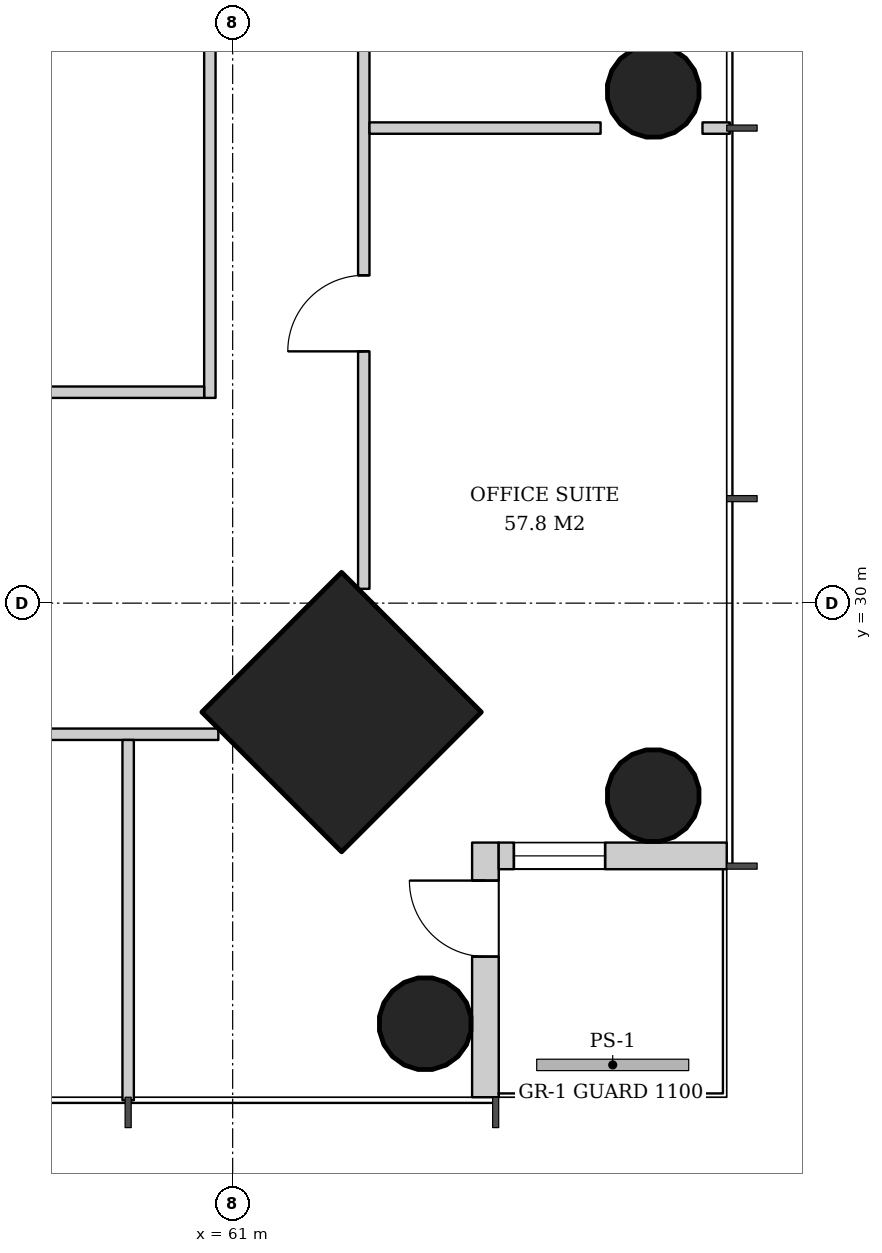
"""IFC4 building model, lengths in metres.
Left out: names, types, materials, properties, quantities, classifications, styles, units other than length and angle.
Written with IfcOpenShell. Run it as: python <this file> out.ifc"""

import sys

from ifc_helpers import new_model, si_unit, direction, frame, frame_2d, origin, origin_2d, place, context, subcontext, project, spatial, rectangle, hollow_circle, extrude, element, fill, save


model = new_model("IFC4")
c1 = context("Model", 3, precision=1e-05, world=origin(), true_north=direction((0.0, 1.0)))
c2 = subcontext(c1, "Body", "Model", "MODEL_VIEW")
j1 = project(units=[si_unit("LENGTHUNIT", "METRE"), si_unit("PLANEANGLEUNIT", "RADIAN")], contexts=[c1])
p1 = place(None, origin())
s1 = spatial("IfcSite", under=j1, at=p1, CompositionType="ELEMENT")
p2 = place(p1, origin())
s2 = spatial("IfcBuilding", under=s1, at=p2, CompositionType="ELEMENT")
p3 = place(p2, frame((0.0, 0.0, 97.0)))
s3 = spatial("IfcBuildingStorey", under=s2, at=p3, CompositionType="ELEMENT", Elevation=97.0)
p4 = place(p3, frame((66.572, 27.428, 0.0), z_axis=(-0.031962158256, 0.031962158256, 0.998977898093), x_axis=(-0.707106781187, -0.707106781187, 0.0)))
e1 = element("IfcColumn", 1, at=p4, inside=s3, PredefinedType="COLUMN", context=c2, shape_type="SweptSolid", body=[
    extrude(hollow_circle(Radius=0.61, WallThickness=0.04, at=origin_2d()), origin(), (0.0, 0.0, 1.0), 3.804),
])
p5 = place(p3, frame((66.572, 36.714, 0.0), z_axis=(-0.031974442509, 0.015923015547, 0.999361842679), x_axis=(-0.445775033553, -0.895145027055, 0.0)))
e2 = element("IfcColumn", 2, at=p5, inside=s3, PredefinedType="COLUMN", context=c2, shape_type="SweptSolid", body=[
    extrude(hollow_circle(Radius=0.61, WallThickness=0.04, at=origin_2d()), origin(), (0.0, 0.0, 1.0), 3.802),
])
p6 = place(p3, frame((62.471, 28.529, 0.0), z_axis=(-0.031898107953, 0.031898107953, 0.998981992539), x_axis=(-0.707106781187, -0.707106781187, 0.0)))
e3 = element("IfcColumn", 3, at=p6, inside=s3, PredefinedType="COLUMN", context=c2, shape_type="SweptSolid", body=[
    extrude(rectangle(XDim=2.6, YDim=2.6, at=origin_2d()), origin(), (0.0, 0.0, 1.0), 3.804),
])
p7 = place(p3, frame((63.572, 24.428, 0.0), z_axis=(-0.031962158256, 0.031962158256, 0.998977898093), x_axis=(-0.707106781187, -0.707106781187, 0.0)))
e4 = element("IfcColumn", 4, at=p7, inside=s3, PredefinedType="COLUMN", context=c2, shape_type="SweptSolid", body=[
    extrude(hollow_circle(Radius=0.61, WallThickness=0.04, at=origin_2d()), origin(), (0.0, 0.0, 1.0), 3.804),
])
p8 = place(p3, frame((64.325, 23.5, 0.0), z_axis=(0.0, 0.0, 1.0), x_axis=(0.0, 1.0, 0.0)))
e5 = element("IfcWall", 5, at=p8, inside=s3, PredefinedType="SOLIDWALL", context=c2, shape_type="SweptSolid", body=[
    extrude(rectangle(XDim=3.35, YDim=0.35, at=frame_2d((1.675, 0.0))), origin(), (0.0, 0.0, 1.0), 3.62),
])
p9 = place(p8, frame((1.85, 0.0, 0.0)))
e6 = element("IfcOpeningElement", 6, at=p9, cuts=e5, PredefinedType="OPENING", context=c2, shape_type="SweptSolid", body=[
    extrude(rectangle(XDim=1.0, YDim=2.4, at=frame_2d((0.5, 1.2))), frame((0.0, 0.185, 0.0), z_axis=(0.0, -1.0, 0.0), x_axis=(1.0, 0.0, 0.0)), (0.0, 0.0, 1.0), 0.37),
])
p10 = place(p3, frame((64.5, 26.675, 0.0), z_axis=(0.0, 0.0, 1.0), x_axis=(1.0, 0.0, 0.0)))
e7 = element("IfcWall", 7, at=p10, inside=s3, PredefinedType="SOLIDWALL", context=c2, shape_type="SweptSolid", body=[
    extrude(rectangle(XDim=3.0, YDim=0.35, at=frame_2d((1.5, 0.0))), origin(), (0.0, 0.0, 1.0), 3.62),
])
p11 = place(p10, frame((0.2, 0.0, 0.6)))
e8 = element("IfcOpeningElement", 8, at=p11, cuts=e7, PredefinedType="OPENING", context=c2, shape_type="SweptSolid", body=[
    extrude(rectangle(XDim=1.2, YDim=2.55, at=frame_2d((0.6, 1.275))), frame((0.0, 0.185, 0.0), z_axis=(0.0, -1.0, 0.0), x_axis=(1.0, 0.0, 0.0)), (0.0, 0.0, 1.0), 0.37),
])
p12 = place(p3, frame((60.7, 32.7, 0.0), z_axis=(0.0, 0.0, 1.0), x_axis=(0.0, 1.0, 0.0)))
e9 = element("IfcWall", 9, at=p12, inside=s3, PredefinedType="PARTITIONING", context=c2, shape_type="SweptSolid", body=[
    extrude(rectangle(XDim=11.275, YDim=0.15, at=frame_2d((5.638, 0.0))), origin(), (0.0, 0.0, 1.0), 2.72),
])
p13 = place(p12, frame((5.137, 0.0, 0.0)))
e10 = element("IfcOpeningElement", 10, at=p13, cuts=e9, PredefinedType="OPENING", context=c2, shape_type="SweptSolid", body=[
    extrude(rectangle(XDim=1.0, YDim=2.1, at=frame_2d((0.5, 1.05))), frame((0.0, 0.085, 0.0), z_axis=(0.0, -1.0, 0.0), x_axis=(1.0, 0.0, 0.0)), (0.0, 0.0, 1.0), 0.17),
])
p14 = place(p3, frame((58.3, 32.775, 0.0), z_axis=(0.0, 0.0, 1.0), x_axis=(1.0, 0.0, 0.0)))
e11 = element("IfcWall", 11, at=p14, inside=s3, PredefinedType="PARTITIONING", context=c2, shape_type="SweptSolid", body=[
    extrude(rectangle(XDim=2.325, YDim=0.15, at=frame_2d((1.163, 0.0))), origin(), (0.0, 0.0, 1.0), 3.62),
])
p15 = place(p3, frame((62.725, 30.188, 0.0), z_axis=(0.0, 0.0, 1.0), x_axis=(0.0, 1.0, 0.0)))
e12 = element("IfcWall", 12, at=p15, inside=s3, PredefinedType="PARTITIONING", context=c2, shape_type="SweptSolid", body=[
    extrude(rectangle(XDim=31.623, YDim=0.15, at=frame_2d((15.812, 0.0))), origin(), (0.0, 0.0, 1.0), 2.72),
])
p16 = place(p15, frame((3.124, 0.0, 0.0)))
e13 = element("IfcOpeningElement", 13, at=p16, cuts=e12, PredefinedType="OPENING", context=c2, shape_type="SweptSolid", body=[
    extrude(rectangle(XDim=1.0, YDim=2.1, at=frame_2d((0.5, 1.05))), frame((0.0, 0.085, 0.0), z_axis=(0.0, -1.0, 0.0), x_axis=(1.0, 0.0, 0.0)), (0.0, 0.0, 1.0), 0.17),
])
p17 = place(p15, frame((7.999, 0.0, 0.0)))
e14 = element("IfcOpeningElement", 14, at=p17, cuts=e12, PredefinedType="OPENING", context=c2, shape_type="SweptSolid", body=[
    extrude(rectangle(XDim=1.0, YDim=2.1, at=frame_2d((0.5, 1.05))), frame((0.0, 0.085, 0.0), z_axis=(0.0, -1.0, 0.0), x_axis=(1.0, 0.0, 0.0)), (0.0, 0.0, 1.0), 0.17),
])
p18 = place(p15, frame((12.874, 0.0, 0.0)))
e15 = element("IfcOpeningElement", 15, at=p18, cuts=e12, PredefinedType="OPENING", context=c2, shape_type="SweptSolid", body=[
    extrude(rectangle(XDim=1.0, YDim=2.1, at=frame_2d((0.5, 1.05))), frame((0.0, 0.085, 0.0), z_axis=(0.0, -1.0, 0.0), x_axis=(1.0, 0.0, 0.0)), (0.0, 0.0, 1.0), 0.17),
])
p19 = place(p15, frame((17.749, 0.0, 0.0)))
e16 = element("IfcOpeningElement", 16, at=p19, cuts=e12, PredefinedType="OPENING", context=c2, shape_type="SweptSolid", body=[
    extrude(rectangle(XDim=1.0, YDim=2.1, at=frame_2d((0.5, 1.05))), frame((0.0, 0.085, 0.0), z_axis=(0.0, -1.0, 0.0), x_axis=(1.0, 0.0, 0.0)), (0.0, 0.0, 1.0), 0.17),
])
p20 = place(p15, frame((27.499, 0.0, 0.0)))
e17 = element("IfcOpeningElement", 17, at=p20, cuts=e12, PredefinedType="OPENING", context=c2, shape_type="SweptSolid", body=[
    extrude(rectangle(XDim=1.0, YDim=2.1, at=frame_2d((0.5, 1.05))), frame((0.0, 0.085, 0.0), z_axis=(0.0, -1.0, 0.0), x_axis=(1.0, 0.0, 0.0)), (0.0, 0.0, 1.0), 0.17),
])
p21 = place(p3, frame((62.8, 36.25, 0.0), z_axis=(0.0, 0.0, 1.0), x_axis=(1.0, 0.0, 0.0)))
e18 = element("IfcWall", 18, at=p21, inside=s3, PredefinedType="PARTITIONING", context=c2, shape_type="SweptSolid", body=[
    extrude(rectangle(XDim=3.041, YDim=0.15, at=frame_2d((1.52, 0.0))), origin(), (0.0, 0.0, 1.0), 3.62),
])
p22 = place(p3, frame((67.181, 36.25, 0.0), z_axis=(0.0, 0.0, 1.0), x_axis=(1.0, 0.0, 0.0)))
e19 = element("IfcWall", 19, at=p22, inside=s3, PredefinedType="PARTITIONING", context=c2, shape_type="SweptSolid", body=[
    extrude(rectangle(XDim=0.359, YDim=0.15, at=frame_2d((0.18, 0.0))), origin(), (0.0, 0.0, 1.0), 3.62),
])
p23 = place(p3, frame((29.188, 28.275, 0.0), z_axis=(0.0, 0.0, 1.0), x_axis=(1.0, 0.0, 0.0)))
e20 = element("IfcWall", 20, at=p23, inside=s3, PredefinedType="PARTITIONING", context=c2, shape_type="SweptSolid", body=[
    extrude(rectangle(XDim=31.623, YDim=0.15, at=frame_2d((15.812, 0.0))), origin(), (0.0, 0.0, 1.0), 2.72),
])
p24 = place(p23, frame((2.724, 0.0, 0.0)))
e21 = element("IfcOpeningElement", 21, at=p24, cuts=e20, PredefinedType="OPENING", context=c2, shape_type="SweptSolid", body=[
    extrude(rectangle(XDim=1.8, YDim=2.4, at=frame_2d((0.9, 1.2))), frame((0.0, 0.085, 0.0), z_axis=(0.0, -1.0, 0.0), x_axis=(1.0, 0.0, 0.0)), (0.0, 0.0, 1.0), 0.17),
])
p25 = place(p23, frame((7.599, 0.0, 0.0)))
e22 = element("IfcOpeningElement", 22, at=p25, cuts=e20, PredefinedType="OPENING", context=c2, shape_type="SweptSolid", body=[
    extrude(rectangle(XDim=1.8, YDim=2.4, at=frame_2d((0.9, 1.2))), frame((0.0, 0.085, 0.0), z_axis=(0.0, -1.0, 0.0), x_axis=(1.0, 0.0, 0.0)), (0.0, 0.0, 1.0), 0.17),
])
p26 = place(p3, frame((59.625, 28.2, 0.0), z_axis=(0.0, 0.0, 1.0), x_axis=(0.0, -1.0, 0.0)))
e23 = element("IfcWall", 23, at=p26, inside=s3, PredefinedType="PARTITIONING", context=c2, shape_type="SweptSolid", body=[
    extrude(rectangle(XDim=4.74, YDim=0.15, at=frame_2d((2.37, 0.0))), origin(), (0.0, 0.0, 1.0), 2.82),
])
p27 = place(p9, origin())
e24 = element("IfcDoor", 24, at=p27, inside=s3, OperationType="SINGLE_SWING_RIGHT", PredefinedType="DOOR", context=c2, shape_type="SweptSolid", body=[
    extrude(rectangle(XDim=1.0, YDim=2.4, at=frame_2d((0.5, 1.2))), frame((0.0, 0.025, 0.0), z_axis=(0.0, -1.0, 0.0), x_axis=(1.0, 0.0, 0.0)), (0.0, 0.0, 1.0), 0.05),
])
fill(e6, e24)
p28 = place(p11, origin())
e25 = element("IfcWindow", 25, at=p28, inside=s3, PartitioningType="SINGLE_PANEL", PredefinedType="WINDOW", context=c2, shape_type="SweptSolid", body=[
    extrude(rectangle(XDim=1.2, YDim=2.55, at=frame_2d((0.6, 1.275))), frame((0.0, 0.03, 0.0), z_axis=(0.0, -1.0, 0.0), x_axis=(1.0, 0.0, 0.0)), (0.0, 0.0, 1.0), 0.06),
])
fill(e8, e25)
p29 = place(p16, origin())
e26 = element("IfcDoor", 26, at=p29, inside=s3, OperationType="SINGLE_SWING_LEFT", PredefinedType="DOOR", context=c2, shape_type="SweptSolid", body=[
    extrude(rectangle(XDim=1.0, YDim=2.1, at=frame_2d((0.5, 1.05))), frame((0.0, 0.025, 0.0), z_axis=(0.0, -1.0, 0.0), x_axis=(1.0, 0.0, 0.0)), (0.0, 0.0, 1.0), 0.05),
])
fill(e13, e26)
save(model, sys.argv[1])
